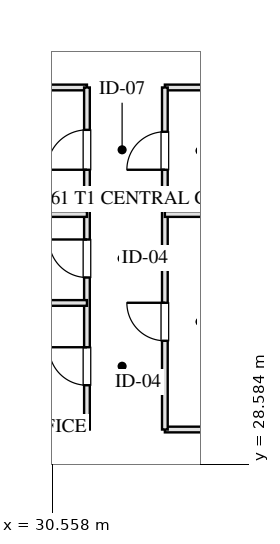
"""IFC4 building model, lengths in metres.
Left out: names, types, materials, properties, quantities, classifications, styles, units other than length and angle.
Written with IfcOpenShell. Run it as: python <this file> out.ifc"""

import sys

from ifc_helpers import new_model, si_unit, direction, frame, frame_2d, origin, place, context, subcontext, project, spatial, rectangle, extrude, element, fill, save


model = new_model("IFC4")
c1 = context("Model", 3, precision=1e-05, world=origin(), true_north=direction((0.0, 1.0)))
c2 = subcontext(c1, "Body", "Model", "MODEL_VIEW")
j1 = project(units=[si_unit("LENGTHUNIT", "METRE"), si_unit("PLANEANGLEUNIT", "RADIAN")], contexts=[c1])
p1 = place(None, origin())
s1 = spatial("IfcSite", under=j1, at=p1, CompositionType="ELEMENT")
p2 = place(p1, origin())
s2 = spatial("IfcBuilding", under=s1, at=p2, CompositionType="ELEMENT")
p3 = place(p2, frame((0.0, 0.0, 226.55)))
s3 = spatial("IfcBuildingStorey", under=s2, at=p3, CompositionType="ELEMENT", Elevation=226.55)
p4 = place(p3, frame((15.0, 29.5, 0.0), z_axis=(0.0, 0.0, 1.0), x_axis=(1.0, 0.0, 0.0)))
e1 = element("IfcWall", 1, at=p4, inside=s3, PredefinedType="PARTITIONING", context=c2, shape_type="SweptSolid", body=[
    extrude(rectangle(XDim=16.475, YDim=0.15, at=frame_2d((8.238, 0.0))), origin(), (0.0, 0.0, 1.0), 3.155),
])
p5 = place(p4, frame((5.2, 0.0, 0.0)))
e2 = element("IfcOpeningElement", 2, at=p5, cuts=e1, PredefinedType="OPENING", context=c2, shape_type="SweptSolid", body=[
    extrude(rectangle(XDim=1.0, YDim=2.05, at=frame_2d((0.5, 1.025))), frame((0.0, 0.085, 0.0), z_axis=(0.0, -1.0, 0.0), x_axis=(1.0, 0.0, 0.0)), (0.0, 0.0, 1.0), 0.17),
])
p6 = place(p3, frame((33.525, 29.5, 0.0), z_axis=(0.0, 0.0, 1.0), x_axis=(1.0, 0.0, 0.0)))
e3 = element("IfcWall", 3, at=p6, inside=s3, PredefinedType="PARTITIONING", context=c2, shape_type="SweptSolid", body=[
    extrude(rectangle(XDim=11.475, YDim=0.15, at=frame_2d((5.738, 0.0))), origin(), (0.0, 0.0, 1.0), 3.155),
])
p7 = place(p3, frame((15.0, 38.5, 0.0), z_axis=(0.0, 0.0, 1.0), x_axis=(1.0, 0.0, 0.0)))
e4 = element("IfcWall", 4, at=p7, inside=s3, PredefinedType="PARTITIONING", context=c2, shape_type="SweptSolid", body=[
    extrude(rectangle(XDim=16.475, YDim=0.15, at=frame_2d((8.238, 0.0))), origin(), (0.0, 0.0, 1.0), 3.155),
])
p8 = place(p3, frame((33.525, 38.5, 0.0), z_axis=(0.0, 0.0, 1.0), x_axis=(1.0, 0.0, 0.0)))
e5 = element("IfcWall", 5, at=p8, inside=s3, PredefinedType="PARTITIONING", context=c2, shape_type="SweptSolid", body=[
    extrude(rectangle(XDim=11.475, YDim=0.15, at=frame_2d((5.738, 0.0))), origin(), (0.0, 0.0, 1.0), 3.155),
])
p9 = place(p3, frame((31.475, 29.5, 0.0), z_axis=(0.0, 0.0, 1.0), x_axis=(0.0, 1.0, 0.0)))
e6 = element("IfcWall", 6, at=p9, inside=s3, PredefinedType="PARTITIONING", context=c2, shape_type="SweptSolid", body=[
    extrude(rectangle(XDim=9.0, YDim=0.15, at=frame_2d((4.5, 0.0))), origin(), (0.0, 0.0, 1.0), 3.155),
])
p10 = place(p9, frame((1.165, 0.0, 0.0)))
e7 = element("IfcOpeningElement", 7, at=p10, cuts=e6, PredefinedType="OPENING", context=c2, shape_type="SweptSolid", body=[
    extrude(rectangle(XDim=1.0, YDim=2.05, at=frame_2d((0.5, 1.025))), frame((0.0, 0.085, 0.0), z_axis=(0.0, -1.0, 0.0), x_axis=(1.0, 0.0, 0.0)), (0.0, 0.0, 1.0), 0.17),
])
p11 = place(p9, frame((4.0, 0.0, 0.0)))
e8 = element("IfcOpeningElement", 8, at=p11, cuts=e6, PredefinedType="OPENING", context=c2, shape_type="SweptSolid", body=[
    extrude(rectangle(XDim=1.0, YDim=2.05, at=frame_2d((0.5, 1.025))), frame((0.0, 0.085, 0.0), z_axis=(0.0, -1.0, 0.0), x_axis=(1.0, 0.0, 0.0)), (0.0, 0.0, 1.0), 0.17),
])
p12 = place(p9, frame((6.835, 0.0, 0.0)))
e9 = element("IfcOpeningElement", 9, at=p12, cuts=e6, PredefinedType="OPENING", context=c2, shape_type="SweptSolid", body=[
    extrude(rectangle(XDim=1.05, YDim=2.05, at=frame_2d((0.525, 1.025))), frame((0.0, 0.085, 0.0), z_axis=(0.0, -1.0, 0.0), x_axis=(1.0, 0.0, 0.0)), (0.0, 0.0, 1.0), 0.17),
])
p13 = place(p3, frame((33.525, 29.5, 0.0), z_axis=(0.0, 0.0, 1.0), x_axis=(0.0, 1.0, 0.0)))
e10 = element("IfcWall", 10, at=p13, inside=s3, PredefinedType="PARTITIONING", context=c2, shape_type="SweptSolid", body=[
    extrude(rectangle(XDim=9.0, YDim=0.15, at=frame_2d((4.5, 0.0))), origin(), (0.0, 0.0, 1.0), 3.155),
])
p14 = place(p13, frame((2.335, 0.0, 0.0)))
e11 = element("IfcOpeningElement", 11, at=p14, cuts=e10, PredefinedType="OPENING", context=c2, shape_type="SweptSolid", body=[
    extrude(rectangle(XDim=1.0, YDim=2.05, at=frame_2d((0.5, 1.025))), frame((0.0, 0.085, 0.0), z_axis=(0.0, -1.0, 0.0), x_axis=(1.0, 0.0, 0.0)), (0.0, 0.0, 1.0), 0.17),
])
p15 = place(p13, frame((6.835, 0.0, 0.0)))
e12 = element("IfcOpeningElement", 12, at=p15, cuts=e10, PredefinedType="OPENING", context=c2, shape_type="SweptSolid", body=[
    extrude(rectangle(XDim=1.0, YDim=2.05, at=frame_2d((0.5, 1.025))), frame((0.0, 0.085, 0.0), z_axis=(0.0, -1.0, 0.0), x_axis=(1.0, 0.0, 0.0)), (0.0, 0.0, 1.0), 0.17),
])
for number, where, z_axis, x_axis in (
    (13, (15.0, 32.83, 0.0), (0.0, 0.0, 1.0), (1.0, 0.0, 0.0)),
    (14, (15.0, 35.17, 0.0), (0.0, 0.0, 1.0), (1.0, 0.0, 0.0)),
):
    element("IfcWall", number, at=place(p3, frame(where, z_axis=z_axis, x_axis=x_axis)), inside=s3, PredefinedType="PARTITIONING", context=c2, shape_type="SweptSolid", body=[
        extrude(rectangle(XDim=16.475, YDim=0.15, at=frame_2d((8.238, 0.0))), origin(), (0.0, 0.0, 1.0), 3.155),
    ])
p16 = place(p3, frame((33.525, 35.17, 0.0), z_axis=(0.0, 0.0, 1.0), x_axis=(1.0, 0.0, 0.0)))
e15 = element("IfcWall", 15, at=p16, inside=s3, PredefinedType="PARTITIONING", context=c2, shape_type="SweptSolid", body=[
    extrude(rectangle(XDim=11.475, YDim=0.15, at=frame_2d((5.738, 0.0))), origin(), (0.0, 0.0, 1.0), 3.155),
])
p17 = place(p10, origin())
e16 = element("IfcDoor", 16, at=p17, inside=s3, OperationType="SINGLE_SWING_RIGHT", PredefinedType="DOOR", context=c2, shape_type="SweptSolid", body=[
    extrude(rectangle(XDim=1.0, YDim=2.05, at=frame_2d((0.5, 1.025))), frame((0.0, 0.025, 0.0), z_axis=(0.0, -1.0, 0.0), x_axis=(1.0, 0.0, 0.0)), (0.0, 0.0, 1.0), 0.05),
])
fill(e7, e16)
p18 = place(p11, origin())
e17 = element("IfcDoor", 17, at=p18, inside=s3, OperationType="SINGLE_SWING_RIGHT", PredefinedType="DOOR", context=c2, shape_type="SweptSolid", body=[
    extrude(rectangle(XDim=1.0, YDim=2.05, at=frame_2d((0.5, 1.025))), frame((0.0, 0.025, 0.0), z_axis=(0.0, -1.0, 0.0), x_axis=(1.0, 0.0, 0.0)), (0.0, 0.0, 1.0), 0.05),
])
fill(e8, e17)
p19 = place(p12, origin())
e18 = element("IfcDoor", 18, at=p19, inside=s3, OperationType="SINGLE_SWING_LEFT", PredefinedType="DOOR", context=c2, shape_type="SweptSolid", body=[
    extrude(rectangle(XDim=1.05, YDim=2.05, at=frame_2d((0.525, 1.025))), frame((0.0, 0.025, 0.0), z_axis=(0.0, -1.0, 0.0), x_axis=(1.0, 0.0, 0.0)), (0.0, 0.0, 1.0), 0.05),
])
fill(e9, e18)
p20 = place(p14, origin())
e19 = element("IfcDoor", 19, at=p20, inside=s3, OperationType="SINGLE_SWING_RIGHT", PredefinedType="DOOR", context=c2, shape_type="SweptSolid", body=[
    extrude(rectangle(XDim=1.0, YDim=2.05, at=frame_2d((0.5, 1.025))), frame((0.0, 0.025, 0.0), z_axis=(0.0, -1.0, 0.0), x_axis=(1.0, 0.0, 0.0)), (0.0, 0.0, 1.0), 0.05),
])
fill(e11, e19)
p21 = place(p15, origin())
e20 = element("IfcDoor", 20, at=p21, inside=s3, OperationType="SINGLE_SWING_LEFT", PredefinedType="DOOR", context=c2, shape_type="SweptSolid", body=[
    extrude(rectangle(XDim=1.0, YDim=2.05, at=frame_2d((0.5, 1.025))), frame((0.0, 0.025, 0.0), z_axis=(0.0, -1.0, 0.0), x_axis=(1.0, 0.0, 0.0)), (0.0, 0.0, 1.0), 0.05),
])
fill(e12, e20)
save(model, sys.argv[1])
